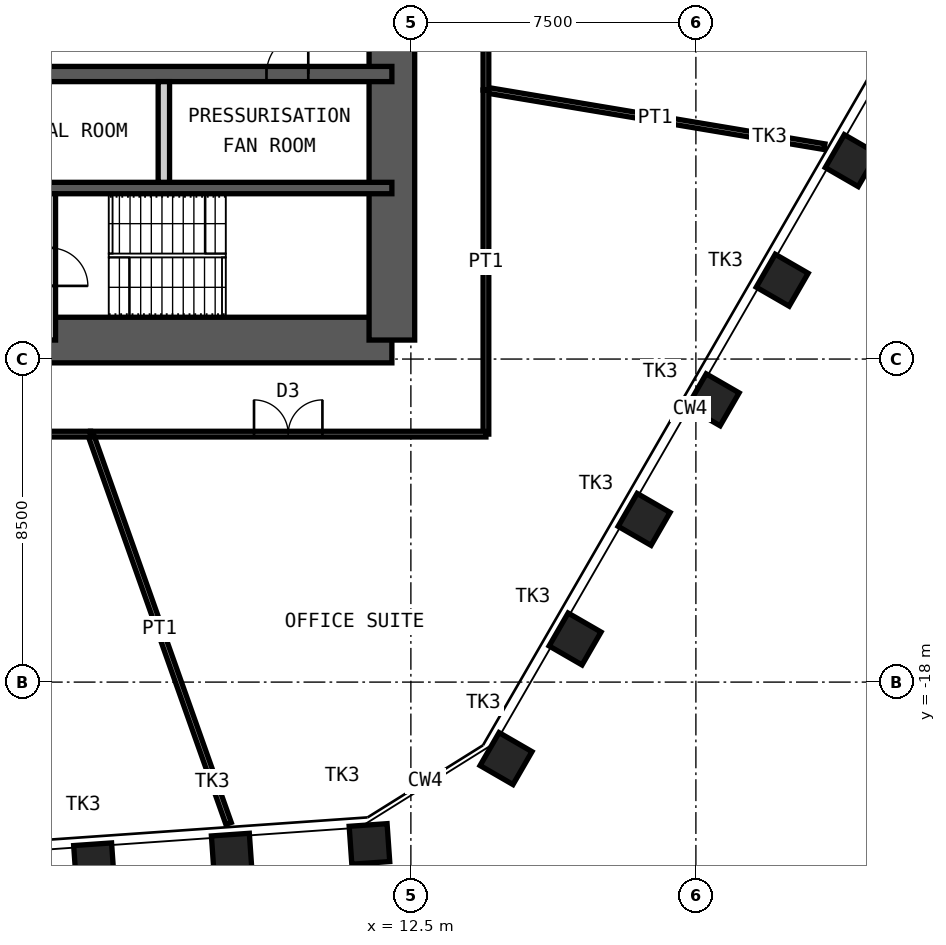
"""IFC4 building model, lengths in metres.
Left out: names, types, materials, properties, quantities, classifications, styles, units other than length and angle.
Written with IfcOpenShell. Run it as: python <this file> out.ifc"""

import sys

from ifc_helpers import new_model, si_unit, direction, frame, frame_2d, origin, origin_2d, place, context, subcontext, project, spatial, rectangle, hollow_rectangle, extrude, element, fill, save


model = new_model("IFC4")
c1 = context("Model", 3, precision=1e-05, world=origin(), true_north=direction((0.0, 1.0)))
c2 = subcontext(c1, "Body", "Model", "MODEL_VIEW")
j1 = project(units=[si_unit("LENGTHUNIT", "METRE"), si_unit("PLANEANGLEUNIT", "RADIAN")], contexts=[c1])
p1 = place(None, origin())
s1 = spatial("IfcSite", under=j1, at=p1, CompositionType="ELEMENT")
p2 = place(p1, origin())
s2 = spatial("IfcBuilding", under=s1, at=p2, CompositionType="ELEMENT")
p3 = place(p2, frame((0.0, 0.0, 251.8)))
s3 = spatial("IfcBuildingStorey", under=s2, at=p3, CompositionType="ELEMENT", Elevation=251.8)
for number, where, z_axis, x_axis in (
    (1, (24.088, -4.279, 0.0), (0.0, 0.0, 1.0), (0.5, 0.866, 0.0)),
    (2, (22.271, -7.426, 0.0), (0.0, 0.0, 1.0), (0.5, 0.866, 0.0)),
    (3, (20.454, -10.572, 0.0), (0.0, 0.0, 1.0), (0.5, 0.866, 0.0)),
    (4, (18.637, -13.719, 0.0), (0.0, 0.0, 1.0), (0.5, 0.866, 0.0)),
    (5, (16.821, -16.866, 0.0), (0.0, 0.0, 1.0), (0.5, 0.866, 0.0)),
    (6, (15.004, -20.012, 0.0), (0.0, 0.0, 1.0), (0.5, 0.866, 0.0)),
    (7, (11.41, -22.258, 0.0), (0.0, 0.0, 1.0), (0.998, 0.07, 0.0)),
    (8, (7.785, -22.512, 0.0), (0.0, 0.0, 1.0), (0.998, 0.07, 0.0)),
    (9, (4.16, -22.765, 0.0), (0.0, 0.0, 1.0), (0.998, 0.07, 0.0)),
):
    element("IfcColumn", number, at=place(p3, frame(where, z_axis=z_axis, x_axis=x_axis)), inside=s3, PredefinedType="COLUMN", context=c2, shape_type="SweptSolid", body=[
        extrude(hollow_rectangle(XDim=1.0, YDim=1.0, WallThickness=0.08, at=origin_2d()), origin(), (0.0, 0.0, 1.0), 4.2),
    ])
p4 = place(p3, frame((-12.0, -9.0, 0.0), z_axis=(0.0, 0.0, 1.0), x_axis=(1.0, 0.0, 0.0)))
e10 = element("IfcWall", 10, at=p4, inside=s3, PredefinedType="SHEAR", context=c2, shape_type="SweptSolid", body=[
    extrude(rectangle(XDim=24.0, YDim=1.2, at=frame_2d((12.0, 0.0))), origin(), (0.0, 0.0, 1.0), 4.2),
])
p5 = place(p4, frame((1.35, 0.0, 0.0)))
e11 = element("IfcOpeningElement", 11, at=p5, cuts=e10, PredefinedType="OPENING", context=c2, shape_type="SweptSolid", body=[
    extrude(rectangle(XDim=1.0, YDim=2.1, at=frame_2d((0.5, 1.05))), frame((0.0, 0.61, 0.0), z_axis=(0.0, -1.0, 0.0), x_axis=(1.0, 0.0, 0.0)), (0.0, 0.0, 1.0), 1.22),
])
p6 = place(p4, frame((5.325, 0.0, 0.0)))
e12 = element("IfcOpeningElement", 12, at=p6, cuts=e10, PredefinedType="OPENING", context=c2, shape_type="SweptSolid", body=[
    extrude(rectangle(XDim=1.15, YDim=2.1, at=frame_2d((0.575, 1.05))), frame((0.0, 0.61, 0.0), z_axis=(0.0, -1.0, 0.0), x_axis=(1.0, 0.0, 0.0)), (0.0, 0.0, 1.0), 1.22),
])
p7 = place(p4, frame((12.6, 0.0, 0.0)))
e13 = element("IfcOpeningElement", 13, at=p7, cuts=e10, PredefinedType="OPENING", context=c2, shape_type="SweptSolid", body=[
    extrude(rectangle(XDim=1.0, YDim=2.1, at=frame_2d((0.5, 1.05))), frame((0.0, 0.61, 0.0), z_axis=(0.0, -1.0, 0.0), x_axis=(1.0, 0.0, 0.0)), (0.0, 0.0, 1.0), 1.22),
])
p8 = place(p3, frame((12.0, -9.0, 0.0), z_axis=(0.0, 0.0, 1.0), x_axis=(0.0, 1.0, 0.0)))
e14 = element("IfcWall", 14, at=p8, inside=s3, PredefinedType="SHEAR", context=c2, shape_type="SweptSolid", body=[
    extrude(rectangle(XDim=18.0, YDim=1.2, at=frame_2d((9.0, 0.0))), origin(), (0.0, 0.0, 1.0), 4.2),
])
p9 = place(p8, frame((8.1, 0.0, 0.0)))
e15 = element("IfcOpeningElement", 15, at=p9, cuts=e14, PredefinedType="OPENING", context=c2, shape_type="SweptSolid", body=[
    extrude(rectangle(XDim=1.8, YDim=2.1, at=frame_2d((0.9, 1.05))), frame((0.0, 0.61, 0.0), z_axis=(0.0, -1.0, 0.0), x_axis=(1.0, 0.0, 0.0)), (0.0, 0.0, 1.0), 1.22),
])
p10 = place(p3, frame((-12.0, -2.0, 0.0), z_axis=(0.0, 0.0, 1.0), x_axis=(1.0, 0.0, 0.0)))
e16 = element("IfcWall", 16, at=p10, inside=s3, PredefinedType="SHEAR", context=c2, shape_type="SweptSolid", body=[
    extrude(rectangle(XDim=24.0, YDim=0.4, at=frame_2d((12.0, 0.0))), origin(), (0.0, 0.0, 1.0), 4.2),
])
p11 = place(p10, frame((1.1, 0.0, 0.0)))
e17 = element("IfcOpeningElement", 17, at=p11, cuts=e16, PredefinedType="OPENING", context=c2, shape_type="SweptSolid", body=[
    extrude(rectangle(XDim=1.1, YDim=2.1, at=frame_2d((0.55, 1.05))), frame((0.0, 0.21, 0.0), z_axis=(0.0, -1.0, 0.0), x_axis=(1.0, 0.0, 0.0)), (0.0, 0.0, 1.0), 0.42),
])
p12 = place(p10, frame((13.55, 0.0, 0.0)))
e18 = element("IfcOpeningElement", 18, at=p12, cuts=e16, PredefinedType="OPENING", context=c2, shape_type="SweptSolid", body=[
    extrude(rectangle(XDim=1.1, YDim=2.1, at=frame_2d((0.55, 1.05))), frame((0.0, 0.21, 0.0), z_axis=(0.0, -1.0, 0.0), x_axis=(1.0, 0.0, 0.0)), (0.0, 0.0, 1.0), 0.42),
])
p13 = place(p10, frame((20.7, 0.0, 0.0)))
e19 = element("IfcOpeningElement", 19, at=p13, cuts=e16, PredefinedType="OPENING", context=c2, shape_type="SweptSolid", body=[
    extrude(rectangle(XDim=1.1, YDim=2.1, at=frame_2d((0.55, 1.05))), frame((0.0, 0.21, 0.0), z_axis=(0.0, -1.0, 0.0), x_axis=(1.0, 0.0, 0.0)), (0.0, 0.0, 1.0), 0.42),
])
p14 = place(p10, frame((4.0, 0.0, 0.0)))
e20 = element("IfcOpeningElement", 20, at=p14, cuts=e16, PredefinedType="OPENING", context=c2, shape_type="SweptSolid", body=[
    extrude(rectangle(XDim=1.0, YDim=2.1, at=frame_2d((0.5, 1.05))), frame((0.0, 0.21, 0.0), z_axis=(0.0, -1.0, 0.0), x_axis=(1.0, 0.0, 0.0)), (0.0, 0.0, 1.0), 0.42),
])
p15 = place(p10, frame((6.8, 0.0, 0.0)))
e21 = element("IfcOpeningElement", 21, at=p15, cuts=e16, PredefinedType="OPENING", context=c2, shape_type="SweptSolid", body=[
    extrude(rectangle(XDim=1.0, YDim=2.1, at=frame_2d((0.5, 1.05))), frame((0.0, 0.21, 0.0), z_axis=(0.0, -1.0, 0.0), x_axis=(1.0, 0.0, 0.0)), (0.0, 0.0, 1.0), 0.42),
])
p16 = place(p3, frame((-12.0, -5.0, 0.0), z_axis=(0.0, 0.0, 1.0), x_axis=(1.0, 0.0, 0.0)))
e22 = element("IfcWall", 22, at=p16, inside=s3, PredefinedType="SHEAR", context=c2, shape_type="SweptSolid", body=[
    extrude(rectangle(XDim=24.0, YDim=0.3, at=frame_2d((12.0, 0.0))), origin(), (0.0, 0.0, 1.0), 4.2),
])
p17 = place(p3, frame((6.0, -4.85, 0.0), z_axis=(0.0, 0.0, 1.0), x_axis=(0.0, 1.0, 0.0)))
e23 = element("IfcWall", 23, at=p17, inside=s3, PredefinedType="PARTITIONING", context=c2, shape_type="SweptSolid", body=[
    extrude(rectangle(XDim=2.65, YDim=0.3, at=frame_2d((1.325, 0.0))), origin(), (0.0, 0.0, 1.0), 3.98),
])
p18 = place(p3, frame((3.0, -9.0, 0.0), z_axis=(0.0, 0.0, 1.0), x_axis=(0.0, 1.0, 0.0)))
e24 = element("IfcWall", 24, at=p18, inside=s3, PredefinedType="PARTITIONING", context=c2, shape_type="SweptSolid", body=[
    extrude(rectangle(XDim=3.85, YDim=0.3, at=frame_2d((1.925, 0.0))), origin(), (0.0, 0.0, 1.0), 3.98),
])
p19 = place(p18, frame((1.425, 0.0, 0.0)))
e25 = element("IfcOpeningElement", 25, at=p19, cuts=e24, PredefinedType="OPENING", context=c2, shape_type="SweptSolid", body=[
    extrude(rectangle(XDim=1.0, YDim=2.1, at=frame_2d((0.5, 1.05))), frame((0.0, 0.16, 0.0), z_axis=(0.0, -1.0, 0.0), x_axis=(1.0, 0.0, 0.0)), (0.0, 0.0, 1.0), 0.32),
])
p20 = place(p3, frame((23.383, -3.912, 0.0), z_axis=(0.0, 0.0, 1.0), x_axis=(-0.986293651891, 0.164999491631, 0.0)))
e26 = element("IfcWall", 26, at=p20, inside=s3, PredefinedType="PARTITIONING", context=c2, shape_type="SweptSolid", body=[
    extrude(rectangle(XDim=9.032, YDim=0.15, at=frame_2d((4.516, 0.0))), origin(), (0.0, 0.0, 1.0), 2.72),
])
p21 = place(p3, frame((14.475, -2.422, 0.0), z_axis=(0.0, 0.0, 1.0), x_axis=(0.0, -1.0, 0.0)))
e27 = element("IfcWall", 27, at=p21, inside=s3, PredefinedType="PARTITIONING", context=c2, shape_type="SweptSolid", body=[
    extrude(rectangle(XDim=9.053, YDim=0.15, at=frame_2d((4.527, 0.0))), origin(), (0.0, 0.0, 1.0), 3.92),
])
p22 = place(p3, frame((14.475, -11.475, 0.0), z_axis=(0.0, 0.0, 1.0), x_axis=(-1.0, 0.0, 0.0)))
e28 = element("IfcWall", 28, at=p22, inside=s3, PredefinedType="PARTITIONING", context=c2, shape_type="SweptSolid", body=[
    extrude(rectangle(XDim=10.406, YDim=0.15, at=frame_2d((5.203, 0.0))), origin(), (0.0, 0.0, 1.0), 3.92),
])
p23 = place(p22, frame((4.303, 0.0, 0.0)))
e29 = element("IfcOpeningElement", 29, at=p23, cuts=e28, PredefinedType="OPENING", context=c2, shape_type="SweptSolid", body=[
    extrude(rectangle(XDim=1.8, YDim=2.4, at=frame_2d((0.9, 1.2))), frame((0.0, 0.085, 0.0), z_axis=(0.0, -1.0, 0.0), x_axis=(1.0, 0.0, 0.0)), (0.0, 0.0, 1.0), 0.17),
])
p24 = place(p3, frame((7.703, -21.719, 0.0), z_axis=(0.0, 0.0, 1.0), x_axis=(-0.334269551553, 0.942477515331, 0.0)))
e30 = element("IfcWall", 30, at=p24, inside=s3, PredefinedType="PARTITIONING", context=c2, shape_type="SweptSolid", body=[
    extrude(rectangle(XDim=10.869, YDim=0.15, at=frame_2d((5.435, 0.0))), origin(), (0.0, 0.0, 1.0), 2.72),
])
p25 = place(p3, frame((4.07, -11.475, 0.0), z_axis=(0.0, 0.0, 1.0), x_axis=(-1.0, 0.0, 0.0)))
e31 = element("IfcWall", 31, at=p25, inside=s3, PredefinedType="PARTITIONING", context=c2, shape_type="SweptSolid", body=[
    extrude(rectangle(XDim=13.528, YDim=0.15, at=frame_2d((6.764, 0.0))), origin(), (0.0, 0.0, 1.0), 3.92),
])
p26 = place(p25, frame((5.864, 0.0, 0.0)))
e32 = element("IfcOpeningElement", 32, at=p26, cuts=e31, PredefinedType="OPENING", context=c2, shape_type="SweptSolid", body=[
    extrude(rectangle(XDim=1.8, YDim=2.4, at=frame_2d((0.9, 1.2))), frame((0.0, 0.085, 0.0), z_axis=(0.0, -1.0, 0.0), x_axis=(1.0, 0.0, 0.0)), (0.0, 0.0, 1.0), 0.17),
])
p27 = place(p3, frame((14.475, 3.475, 0.0), z_axis=(0.0, 0.0, 1.0), x_axis=(0.0, -1.0, 0.0)))
e33 = element("IfcWall", 33, at=p27, inside=s3, PredefinedType="PARTITIONING", context=c2, shape_type="SweptSolid", body=[
    extrude(rectangle(XDim=5.896, YDim=0.15, at=frame_2d((2.948, 0.0))), origin(), (0.0, 0.0, 1.0), 3.92),
])
p28 = place(p27, frame((2.448, 0.0, 0.0)))
e34 = element("IfcOpeningElement", 34, at=p28, cuts=e33, PredefinedType="OPENING", context=c2, shape_type="SweptSolid", body=[
    extrude(rectangle(XDim=1.0, YDim=2.4, at=frame_2d((0.5, 1.2))), frame((0.0, 0.085, 0.0), z_axis=(0.0, -1.0, 0.0), x_axis=(1.0, 0.0, 0.0)), (0.0, 0.0, 1.0), 0.17),
])
p29 = place(p13, origin())
e35 = element("IfcDoor", 35, at=p29, inside=s3, OperationType="SINGLE_SWING_LEFT", PredefinedType="DOOR", context=c2, shape_type="SweptSolid", body=[
    extrude(rectangle(XDim=1.1, YDim=2.1, at=frame_2d((0.55, 1.05))), frame((0.0, 0.025, 0.0), z_axis=(0.0, -1.0, 0.0), x_axis=(1.0, 0.0, 0.0)), (0.0, 0.0, 1.0), 0.05),
])
fill(e19, e35)
p30 = place(p23, origin())
e36 = element("IfcDoor", 36, at=p30, inside=s3, OperationType="DOUBLE_DOOR_DOUBLE_SWING", PredefinedType="DOOR", context=c2, shape_type="SweptSolid", body=[
    extrude(rectangle(XDim=1.8, YDim=2.4, at=frame_2d((0.9, 1.2))), frame((0.0, 0.025, 0.0), z_axis=(0.0, -1.0, 0.0), x_axis=(1.0, 0.0, 0.0)), (0.0, 0.0, 1.0), 0.05),
])
fill(e29, e36)
save(model, sys.argv[1])
